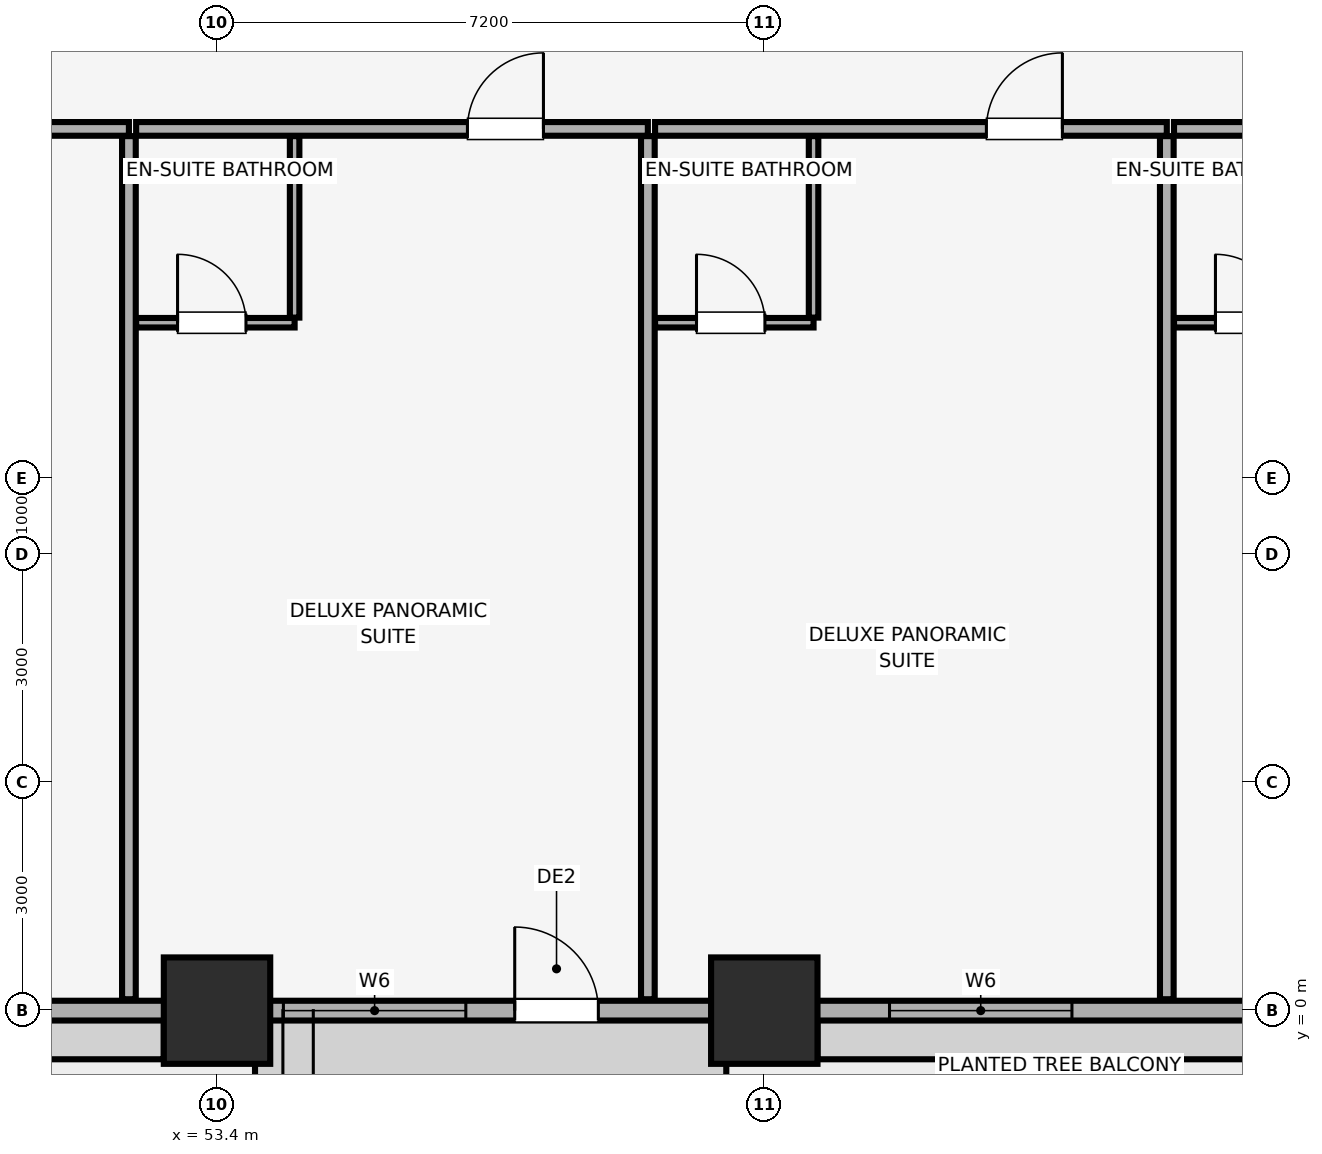
"""IFC4 building model, lengths in metres.
Left out: names, types, materials, properties, quantities, classifications, styles, units other than length and angle.
Written with IfcOpenShell. Run it as: python <this file> out.ifc"""

import sys

from ifc_helpers import new_model, si_unit, direction, frame, frame_2d, origin, origin_2d, place, context, subcontext, project, spatial, rectangle, extrude, element, fill, save


model = new_model("IFC4")
c1 = context("Model", 3, precision=1e-05, world=origin(), true_north=direction((0.0, 1.0)))
c2 = subcontext(c1, "Body", "Model", "MODEL_VIEW")
j1 = project(units=[si_unit("LENGTHUNIT", "METRE"), si_unit("PLANEANGLEUNIT", "RADIAN")], contexts=[c1])
p1 = place(None, origin())
s1 = spatial("IfcSite", under=j1, at=p1, CompositionType="ELEMENT")
p2 = place(p1, origin())
s2 = spatial("IfcBuilding", under=s1, at=p2, CompositionType="ELEMENT")
p3 = place(p2, frame((0.0, 0.0, 57.65)))
s3 = spatial("IfcBuildingStorey", under=s2, at=p3, CompositionType="ELEMENT", Elevation=57.65)
for number, where, z_axis, x_axis in (
    (1, (53.4, 0.0, 0.0), (0.0, 0.0, 1.0), (1.0, 0.0, 0.0)),
    (2, (60.6, 0.0, 0.0), (0.0, 0.0, 1.0), (1.0, 0.0, 0.0)),
):
    element("IfcColumn", number, at=place(p3, frame(where, z_axis=z_axis, x_axis=x_axis)), inside=s3, PredefinedType="COLUMN", context=c2, shape_type="SweptSolid", body=[
        extrude(rectangle(XDim=1.4, YDim=1.4, at=origin_2d()), origin(), (0.0, 0.0, 1.0), 3.51),
    ])
p4 = place(p3, frame((4.2, 0.0, 0.0), z_axis=(0.0, 0.0, 1.0), x_axis=(1.0, 0.0, 0.0)))
e3 = element("IfcWall", 3, at=p4, inside=s3, PredefinedType="SOLIDWALL", context=c2, shape_type="SweptSolid", body=[
    extrude(rectangle(XDim=75.6, YDim=0.26, at=frame_2d((37.8, 0.0))), origin(), (0.0, 0.0, 1.0), 2.56),
])
p5 = place(p4, frame((21.383, 0.0, 0.0)))
e4 = element("IfcOpeningElement", 4, at=p5, cuts=e3, PredefinedType="OPENING", context=c2, shape_type="SweptSolid", body=[
    extrude(rectangle(XDim=1.1, YDim=2.15, at=frame_2d((0.55, 1.075))), frame((0.0, 0.14, 0.0), z_axis=(0.0, -1.0, 0.0), x_axis=(1.0, 0.0, 0.0)), (0.0, 0.0, 1.0), 0.28),
])
p6 = place(p4, frame((37.25, 0.0, 0.0)))
e5 = element("IfcOpeningElement", 5, at=p6, cuts=e3, PredefinedType="OPENING", context=c2, shape_type="SweptSolid", body=[
    extrude(rectangle(XDim=1.1, YDim=2.15, at=frame_2d((0.55, 1.075))), frame((0.0, 0.14, 0.0), z_axis=(0.0, -1.0, 0.0), x_axis=(1.0, 0.0, 0.0)), (0.0, 0.0, 1.0), 0.28),
])
p7 = place(p4, frame((53.117, 0.0, 0.0)))
e6 = element("IfcOpeningElement", 6, at=p7, cuts=e3, PredefinedType="OPENING", context=c2, shape_type="SweptSolid", body=[
    extrude(rectangle(XDim=1.1, YDim=2.15, at=frame_2d((0.55, 1.075))), frame((0.0, 0.14, 0.0), z_axis=(0.0, -1.0, 0.0), x_axis=(1.0, 0.0, 0.0)), (0.0, 0.0, 1.0), 0.28),
])
p8 = place(p4, frame((1.035, 0.0, 0.85)))
e7 = element("IfcOpeningElement", 7, at=p8, cuts=e3, PredefinedType="OPENING", context=c2, shape_type="SweptSolid", body=[
    extrude(rectangle(XDim=2.4, YDim=1.5, at=frame_2d((1.2, 0.75))), frame((0.0, 0.14, 0.0), z_axis=(0.0, -1.0, 0.0), x_axis=(1.0, 0.0, 0.0)), (0.0, 0.0, 1.0), 0.28),
])
p9 = place(p4, frame((8.138, 0.0, 0.85)))
e8 = element("IfcOpeningElement", 8, at=p9, cuts=e3, PredefinedType="OPENING", context=c2, shape_type="SweptSolid", body=[
    extrude(rectangle(XDim=2.4, YDim=1.5, at=frame_2d((1.2, 0.75))), frame((0.0, 0.14, 0.0), z_axis=(0.0, -1.0, 0.0), x_axis=(1.0, 0.0, 0.0)), (0.0, 0.0, 1.0), 0.28),
])
p10 = place(p4, frame((15.153, 0.0, 0.85)))
e9 = element("IfcOpeningElement", 9, at=p10, cuts=e3, PredefinedType="OPENING", context=c2, shape_type="SweptSolid", body=[
    extrude(rectangle(XDim=2.4, YDim=1.5, at=frame_2d((1.2, 0.75))), frame((0.0, 0.14, 0.0), z_axis=(0.0, -1.0, 0.0), x_axis=(1.0, 0.0, 0.0)), (0.0, 0.0, 1.0), 0.28),
])
p11 = place(p4, frame((23.127, 0.0, 0.85)))
e10 = element("IfcOpeningElement", 10, at=p11, cuts=e3, PredefinedType="OPENING", context=c2, shape_type="SweptSolid", body=[
    extrude(rectangle(XDim=2.4, YDim=1.5, at=frame_2d((1.2, 0.75))), frame((0.0, 0.14, 0.0), z_axis=(0.0, -1.0, 0.0), x_axis=(1.0, 0.0, 0.0)), (0.0, 0.0, 1.0), 0.28),
])
p12 = place(p4, frame((29.179, 0.0, 0.85)))
e11 = element("IfcOpeningElement", 11, at=p12, cuts=e3, PredefinedType="OPENING", context=c2, shape_type="SweptSolid", body=[
    extrude(rectangle(XDim=2.4, YDim=1.5, at=frame_2d((1.2, 0.75))), frame((0.0, 0.14, 0.0), z_axis=(0.0, -1.0, 0.0), x_axis=(1.0, 0.0, 0.0)), (0.0, 0.0, 1.0), 0.28),
])
p13 = place(p4, frame((34.983, 0.0, 0.85)))
e12 = element("IfcOpeningElement", 12, at=p13, cuts=e3, PredefinedType="OPENING", context=c2, shape_type="SweptSolid", body=[
    extrude(rectangle(XDim=1.5, YDim=1.4, at=frame_2d((0.75, 0.7))), frame((0.0, 0.14, 0.0), z_axis=(0.0, -1.0, 0.0), x_axis=(1.0, 0.0, 0.0)), (0.0, 0.0, 1.0), 0.28),
])
p14 = place(p4, frame((39.117, 0.0, 0.85)))
e13 = element("IfcOpeningElement", 13, at=p14, cuts=e3, PredefinedType="OPENING", context=c2, shape_type="SweptSolid", body=[
    extrude(rectangle(XDim=1.5, YDim=1.4, at=frame_2d((0.75, 0.7))), frame((0.0, 0.14, 0.0), z_axis=(0.0, -1.0, 0.0), x_axis=(1.0, 0.0, 0.0)), (0.0, 0.0, 1.0), 0.28),
])
p15 = place(p4, frame((44.021, 0.0, 0.85)))
e14 = element("IfcOpeningElement", 14, at=p15, cuts=e3, PredefinedType="OPENING", context=c2, shape_type="SweptSolid", body=[
    extrude(rectangle(XDim=2.4, YDim=1.5, at=frame_2d((1.2, 0.75))), frame((0.0, 0.14, 0.0), z_axis=(0.0, -1.0, 0.0), x_axis=(1.0, 0.0, 0.0)), (0.0, 0.0, 1.0), 0.28),
])
p16 = place(p4, frame((50.073, 0.0, 0.85)))
e15 = element("IfcOpeningElement", 15, at=p16, cuts=e3, PredefinedType="OPENING", context=c2, shape_type="SweptSolid", body=[
    extrude(rectangle(XDim=2.4, YDim=1.5, at=frame_2d((1.2, 0.75))), frame((0.0, 0.14, 0.0), z_axis=(0.0, -1.0, 0.0), x_axis=(1.0, 0.0, 0.0)), (0.0, 0.0, 1.0), 0.28),
])
p17 = place(p4, frame((58.048, 0.0, 0.85)))
e16 = element("IfcOpeningElement", 16, at=p17, cuts=e3, PredefinedType="OPENING", context=c2, shape_type="SweptSolid", body=[
    extrude(rectangle(XDim=2.4, YDim=1.5, at=frame_2d((1.2, 0.75))), frame((0.0, 0.14, 0.0), z_axis=(0.0, -1.0, 0.0), x_axis=(1.0, 0.0, 0.0)), (0.0, 0.0, 1.0), 0.28),
])
p18 = place(p4, frame((65.062, 0.0, 0.85)))
e17 = element("IfcOpeningElement", 17, at=p18, cuts=e3, PredefinedType="OPENING", context=c2, shape_type="SweptSolid", body=[
    extrude(rectangle(XDim=2.4, YDim=1.5, at=frame_2d((1.2, 0.75))), frame((0.0, 0.14, 0.0), z_axis=(0.0, -1.0, 0.0), x_axis=(1.0, 0.0, 0.0)), (0.0, 0.0, 1.0), 0.28),
])
p19 = place(p4, frame((72.165, 0.0, 0.85)))
e18 = element("IfcOpeningElement", 18, at=p19, cuts=e3, PredefinedType="OPENING", context=c2, shape_type="SweptSolid", body=[
    extrude(rectangle(XDim=2.4, YDim=1.5, at=frame_2d((1.2, 0.75))), frame((0.0, 0.14, 0.0), z_axis=(0.0, -1.0, 0.0), x_axis=(1.0, 0.0, 0.0)), (0.0, 0.0, 1.0), 0.28),
])
p20 = place(p3, frame((45.509, 11.6, 0.0), z_axis=(0.0, 0.0, 1.0), x_axis=(1.0, 0.0, 0.0)))
e19 = element("IfcWall", 19, at=p20, inside=s3, PredefinedType="PARTITIONING", context=c2, shape_type="SweptSolid", body=[
    extrude(rectangle(XDim=6.732, YDim=0.18, at=frame_2d((3.366, 0.0))), origin(), (0.0, 0.0, 1.0), 3.51),
])
p21 = place(p20, frame((4.359, 0.0, 0.0)))
e20 = element("IfcOpeningElement", 20, at=p21, cuts=e19, PredefinedType="OPENING", context=c2, shape_type="SweptSolid", body=[
    extrude(rectangle(XDim=1.0, YDim=2.15, at=frame_2d((0.5, 1.075))), frame((0.0, 0.1, 0.0), z_axis=(0.0, -1.0, 0.0), x_axis=(1.0, 0.0, 0.0)), (0.0, 0.0, 1.0), 0.2),
])
p22 = place(p3, frame((52.241, 0.15, 0.0), z_axis=(0.0, 0.0, 1.0), x_axis=(0.0, 1.0, 0.0)))
e21 = element("IfcWall", 21, at=p22, inside=s3, PredefinedType="PARTITIONING", context=c2, shape_type="SweptSolid", body=[
    extrude(rectangle(XDim=11.355, YDim=0.18, at=frame_2d((5.677, 0.0))), origin(), (0.0, 0.0, 1.0), 3.51),
])
p23 = place(p3, frame((52.336, 11.6, 0.0), z_axis=(0.0, 0.0, 1.0), x_axis=(1.0, 0.0, 0.0)))
e22 = element("IfcWall", 22, at=p23, inside=s3, PredefinedType="PARTITIONING", context=c2, shape_type="SweptSolid", body=[
    extrude(rectangle(XDim=6.732, YDim=0.18, at=frame_2d((3.366, 0.0))), origin(), (0.0, 0.0, 1.0), 3.51),
])
p24 = place(p23, frame((4.359, 0.0, 0.0)))
e23 = element("IfcOpeningElement", 23, at=p24, cuts=e22, PredefinedType="OPENING", context=c2, shape_type="SweptSolid", body=[
    extrude(rectangle(XDim=1.0, YDim=2.15, at=frame_2d((0.5, 1.075))), frame((0.0, 0.1, 0.0), z_axis=(0.0, -1.0, 0.0), x_axis=(1.0, 0.0, 0.0)), (0.0, 0.0, 1.0), 0.2),
])
p25 = place(p3, frame((59.068, 0.15, 0.0), z_axis=(0.0, 0.0, 1.0), x_axis=(0.0, 1.0, 0.0)))
e24 = element("IfcWall", 24, at=p25, inside=s3, PredefinedType="PARTITIONING", context=c2, shape_type="SweptSolid", body=[
    extrude(rectangle(XDim=11.355, YDim=0.18, at=frame_2d((5.677, 0.0))), origin(), (0.0, 0.0, 1.0), 3.51),
])
p26 = place(p3, frame((52.336, 9.05, 0.0), z_axis=(0.0, 0.0, 1.0), x_axis=(1.0, 0.0, 0.0)))
e25 = element("IfcWall", 25, at=p26, inside=s3, PredefinedType="PARTITIONING", context=c2, shape_type="SweptSolid", body=[
    extrude(rectangle(XDim=2.085, YDim=0.125, at=frame_2d((1.042, 0.0))), origin(), (0.0, 0.0, 1.0), 3.51),
])
p27 = place(p26, frame((0.545, 0.0, 0.0)))
e26 = element("IfcOpeningElement", 26, at=p27, cuts=e25, PredefinedType="OPENING", context=c2, shape_type="SweptSolid", body=[
    extrude(rectangle(XDim=0.9, YDim=2.1, at=frame_2d((0.45, 1.05))), frame((0.0, 0.073, 0.0), z_axis=(0.0, -1.0, 0.0), x_axis=(1.0, 0.0, 0.0)), (0.0, 0.0, 1.0), 0.145),
])
p28 = place(p3, frame((54.421, 9.117, 0.0), z_axis=(0.0, 0.0, 1.0), x_axis=(0.0, 1.0, 0.0)))
e27 = element("IfcWall", 27, at=p28, inside=s3, PredefinedType="PARTITIONING", context=c2, shape_type="SweptSolid", body=[
    extrude(rectangle(XDim=2.387, YDim=0.125, at=frame_2d((1.194, 0.0))), origin(), (0.0, 0.0, 1.0), 3.51),
])
p29 = place(p3, frame((59.163, 11.6, 0.0), z_axis=(0.0, 0.0, 1.0), x_axis=(1.0, 0.0, 0.0)))
e28 = element("IfcWall", 28, at=p29, inside=s3, PredefinedType="PARTITIONING", context=c2, shape_type="SweptSolid", body=[
    extrude(rectangle(XDim=6.732, YDim=0.18, at=frame_2d((3.366, 0.0))), origin(), (0.0, 0.0, 1.0), 3.51),
])
p30 = place(p29, frame((4.359, 0.0, 0.0)))
e29 = element("IfcOpeningElement", 29, at=p30, cuts=e28, PredefinedType="OPENING", context=c2, shape_type="SweptSolid", body=[
    extrude(rectangle(XDim=1.0, YDim=2.15, at=frame_2d((0.5, 1.075))), frame((0.0, 0.1, 0.0), z_axis=(0.0, -1.0, 0.0), x_axis=(1.0, 0.0, 0.0)), (0.0, 0.0, 1.0), 0.2),
])
p31 = place(p3, frame((65.896, 0.15, 0.0), z_axis=(0.0, 0.0, 1.0), x_axis=(0.0, 1.0, 0.0)))
e30 = element("IfcWall", 30, at=p31, inside=s3, PredefinedType="PARTITIONING", context=c2, shape_type="SweptSolid", body=[
    extrude(rectangle(XDim=11.355, YDim=0.18, at=frame_2d((5.677, 0.0))), origin(), (0.0, 0.0, 1.0), 3.51),
])
p32 = place(p3, frame((59.163, 9.05, 0.0), z_axis=(0.0, 0.0, 1.0), x_axis=(1.0, 0.0, 0.0)))
e31 = element("IfcWall", 31, at=p32, inside=s3, PredefinedType="PARTITIONING", context=c2, shape_type="SweptSolid", body=[
    extrude(rectangle(XDim=2.085, YDim=0.125, at=frame_2d((1.042, 0.0))), origin(), (0.0, 0.0, 1.0), 3.51),
])
p33 = place(p32, frame((0.545, 0.0, 0.0)))
e32 = element("IfcOpeningElement", 32, at=p33, cuts=e31, PredefinedType="OPENING", context=c2, shape_type="SweptSolid", body=[
    extrude(rectangle(XDim=0.9, YDim=2.1, at=frame_2d((0.45, 1.05))), frame((0.0, 0.073, 0.0), z_axis=(0.0, -1.0, 0.0), x_axis=(1.0, 0.0, 0.0)), (0.0, 0.0, 1.0), 0.145),
])
p34 = place(p3, frame((61.248, 9.117, 0.0), z_axis=(0.0, 0.0, 1.0), x_axis=(0.0, 1.0, 0.0)))
e33 = element("IfcWall", 33, at=p34, inside=s3, PredefinedType="PARTITIONING", context=c2, shape_type="SweptSolid", body=[
    extrude(rectangle(XDim=2.387, YDim=0.125, at=frame_2d((1.194, 0.0))), origin(), (0.0, 0.0, 1.0), 3.51),
])
p35 = place(p3, frame((65.99, 11.6, 0.0), z_axis=(0.0, 0.0, 1.0), x_axis=(1.0, 0.0, 0.0)))
e34 = element("IfcWall", 34, at=p35, inside=s3, PredefinedType="PARTITIONING", context=c2, shape_type="SweptSolid", body=[
    extrude(rectangle(XDim=6.732, YDim=0.18, at=frame_2d((3.366, 0.0))), origin(), (0.0, 0.0, 1.0), 3.51),
])
p36 = place(p35, frame((4.359, 0.0, 0.0)))
e35 = element("IfcOpeningElement", 35, at=p36, cuts=e34, PredefinedType="OPENING", context=c2, shape_type="SweptSolid", body=[
    extrude(rectangle(XDim=1.0, YDim=2.15, at=frame_2d((0.5, 1.075))), frame((0.0, 0.1, 0.0), z_axis=(0.0, -1.0, 0.0), x_axis=(1.0, 0.0, 0.0)), (0.0, 0.0, 1.0), 0.2),
])
p37 = place(p3, frame((65.99, 9.05, 0.0), z_axis=(0.0, 0.0, 1.0), x_axis=(1.0, 0.0, 0.0)))
e36 = element("IfcWall", 36, at=p37, inside=s3, PredefinedType="PARTITIONING", context=c2, shape_type="SweptSolid", body=[
    extrude(rectangle(XDim=2.085, YDim=0.125, at=frame_2d((1.042, 0.0))), origin(), (0.0, 0.0, 1.0), 3.51),
])
p38 = place(p37, frame((0.545, 0.0, 0.0)))
e37 = element("IfcOpeningElement", 37, at=p38, cuts=e36, PredefinedType="OPENING", context=c2, shape_type="SweptSolid", body=[
    extrude(rectangle(XDim=0.9, YDim=2.1, at=frame_2d((0.45, 1.05))), frame((0.0, 0.073, 0.0), z_axis=(0.0, -1.0, 0.0), x_axis=(1.0, 0.0, 0.0)), (0.0, 0.0, 1.0), 0.145),
])
p39 = place(p7, origin())
e38 = element("IfcDoor", 38, at=p39, inside=s3, OperationType="SINGLE_SWING_LEFT", PredefinedType="DOOR", context=c2, shape_type="SweptSolid", body=[
    extrude(rectangle(XDim=1.1, YDim=2.15, at=frame_2d((0.55, 1.075))), frame((0.0, 0.025, 0.0), z_axis=(0.0, -1.0, 0.0), x_axis=(1.0, 0.0, 0.0)), (0.0, 0.0, 1.0), 0.05),
])
fill(e6, e38)
p40 = place(p16, origin())
e39 = element("IfcWindow", 39, at=p40, inside=s3, PartitioningType="SINGLE_PANEL", PredefinedType="WINDOW", context=c2, shape_type="SweptSolid", body=[
    extrude(rectangle(XDim=2.4, YDim=1.5, at=frame_2d((1.2, 0.75))), frame((0.0, 0.03, 0.0), z_axis=(0.0, -1.0, 0.0), x_axis=(1.0, 0.0, 0.0)), (0.0, 0.0, 1.0), 0.06),
])
fill(e15, e39)
p41 = place(p17, origin())
e40 = element("IfcWindow", 40, at=p41, inside=s3, PartitioningType="SINGLE_PANEL", PredefinedType="WINDOW", context=c2, shape_type="SweptSolid", body=[
    extrude(rectangle(XDim=2.4, YDim=1.5, at=frame_2d((1.2, 0.75))), frame((0.0, 0.03, 0.0), z_axis=(0.0, -1.0, 0.0), x_axis=(1.0, 0.0, 0.0)), (0.0, 0.0, 1.0), 0.06),
])
fill(e16, e40)
p42 = place(p24, origin())
e41 = element("IfcDoor", 41, at=p42, inside=s3, OperationType="SINGLE_SWING_RIGHT", PredefinedType="DOOR", context=c2, shape_type="SweptSolid", body=[
    extrude(rectangle(XDim=1.0, YDim=2.15, at=frame_2d((0.5, 1.075))), frame((0.0, 0.025, 0.0), z_axis=(0.0, -1.0, 0.0), x_axis=(1.0, 0.0, 0.0)), (0.0, 0.0, 1.0), 0.05),
])
fill(e23, e41)
p43 = place(p27, origin())
e42 = element("IfcDoor", 42, at=p43, inside=s3, OperationType="SINGLE_SWING_LEFT", PredefinedType="DOOR", context=c2, shape_type="SweptSolid", body=[
    extrude(rectangle(XDim=0.9, YDim=2.1, at=frame_2d((0.45, 1.05))), frame((0.0, 0.025, 0.0), z_axis=(0.0, -1.0, 0.0), x_axis=(1.0, 0.0, 0.0)), (0.0, 0.0, 1.0), 0.05),
])
fill(e26, e42)
p44 = place(p30, origin())
e43 = element("IfcDoor", 43, at=p44, inside=s3, OperationType="SINGLE_SWING_RIGHT", PredefinedType="DOOR", context=c2, shape_type="SweptSolid", body=[
    extrude(rectangle(XDim=1.0, YDim=2.15, at=frame_2d((0.5, 1.075))), frame((0.0, 0.025, 0.0), z_axis=(0.0, -1.0, 0.0), x_axis=(1.0, 0.0, 0.0)), (0.0, 0.0, 1.0), 0.05),
])
fill(e29, e43)
p45 = place(p33, origin())
e44 = element("IfcDoor", 44, at=p45, inside=s3, OperationType="SINGLE_SWING_LEFT", PredefinedType="DOOR", context=c2, shape_type="SweptSolid", body=[
    extrude(rectangle(XDim=0.9, YDim=2.1, at=frame_2d((0.45, 1.05))), frame((0.0, 0.025, 0.0), z_axis=(0.0, -1.0, 0.0), x_axis=(1.0, 0.0, 0.0)), (0.0, 0.0, 1.0), 0.05),
])
fill(e32, e44)
p46 = place(p38, origin())
e45 = element("IfcDoor", 45, at=p46, inside=s3, OperationType="SINGLE_SWING_LEFT", PredefinedType="DOOR", context=c2, shape_type="SweptSolid", body=[
    extrude(rectangle(XDim=0.9, YDim=2.1, at=frame_2d((0.45, 1.05))), frame((0.0, 0.025, 0.0), z_axis=(0.0, -1.0, 0.0), x_axis=(1.0, 0.0, 0.0)), (0.0, 0.0, 1.0), 0.05),
])
fill(e37, e45)
save(model, sys.argv[1])
